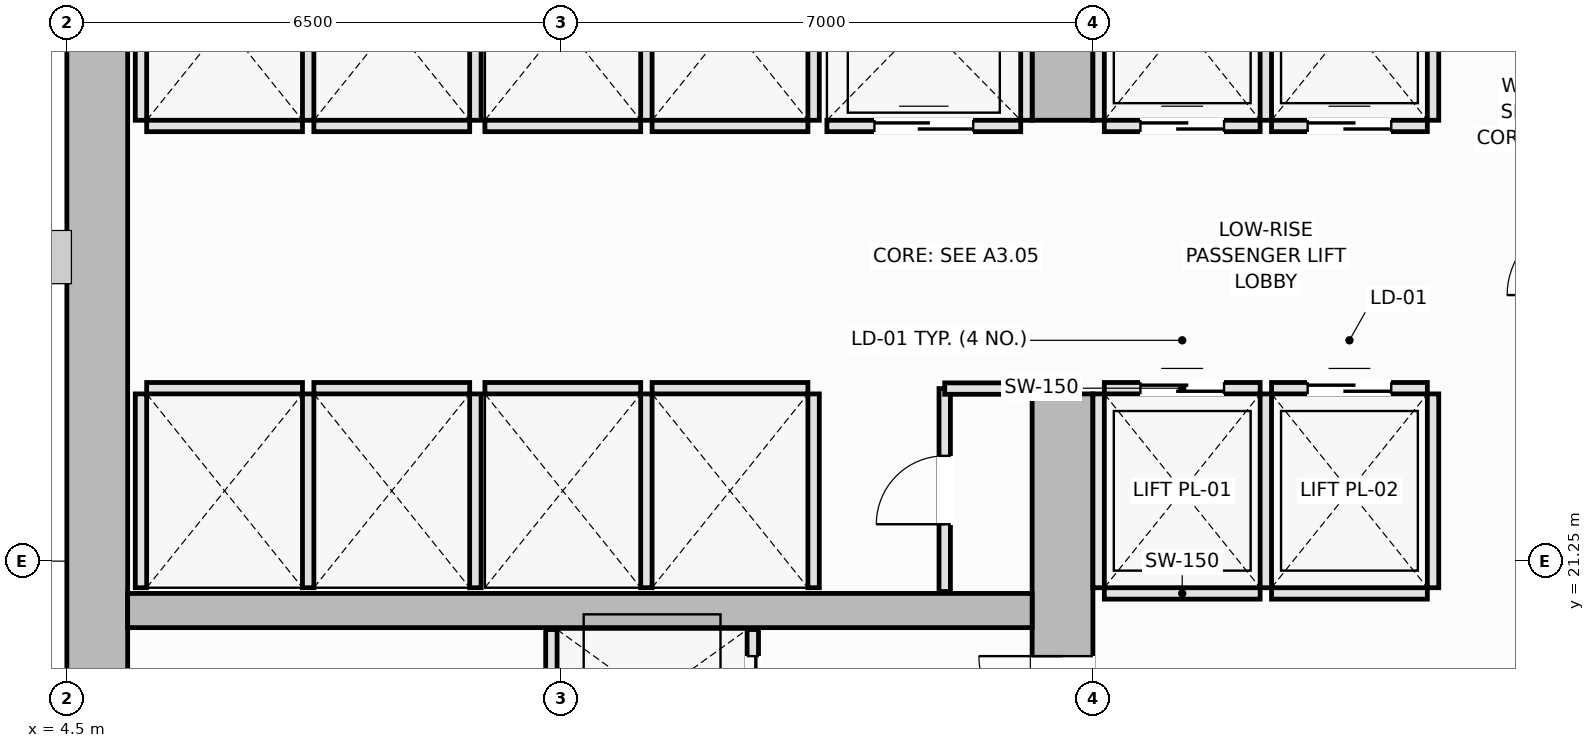
"""IFC4 building model, lengths in metres.
Left out: names, types, materials, properties, quantities, classifications, styles, units other than length and angle.
Written with IfcOpenShell. Run it as: python <this file> out.ifc"""

import sys

from ifc_helpers import new_model, si_unit, direction, frame, frame_2d, origin, place, context, subcontext, project, spatial, rectangle, extrude, element, fill, save


model = new_model("IFC4")
c1 = context("Model", 3, precision=1e-05, world=origin(), true_north=direction((0.0, 1.0)))
c2 = subcontext(c1, "Body", "Model", "MODEL_VIEW")
j1 = project(units=[si_unit("LENGTHUNIT", "METRE"), si_unit("PLANEANGLEUNIT", "RADIAN")], contexts=[c1])
p1 = place(None, origin())
s1 = spatial("IfcSite", under=j1, at=p1, CompositionType="ELEMENT")
p2 = place(p1, origin())
s2 = spatial("IfcBuilding", under=s1, at=p2, CompositionType="ELEMENT")
p3 = place(p2, frame((0.0, 0.0, 32.7)))
s3 = spatial("IfcBuildingStorey", under=s2, at=p3, CompositionType="ELEMENT", Elevation=32.7)
p4 = place(p3, frame((4.9, 14.8, 0.0), z_axis=(0.0, 0.0, 1.0), x_axis=(0.0, 1.0, 0.0)))
e1 = element("IfcWall", 1, at=p4, inside=s3, PredefinedType="SHEAR", context=c2, shape_type="SweptSolid", body=[
    extrude(rectangle(XDim=20.9, YDim=0.8, at=frame_2d((10.45, 0.0))), origin(), (0.0, 0.0, 1.0), 3.55),
])
p5 = place(p3, frame((17.6, 14.8, 0.0), z_axis=(0.0, 0.0, 1.0), x_axis=(0.0, 1.0, 0.0)))
e2 = element("IfcWall", 2, at=p5, inside=s3, PredefinedType="SHEAR", context=c2, shape_type="SweptSolid", body=[
    extrude(rectangle(XDim=8.65, YDim=0.8, at=frame_2d((4.325, 0.0))), origin(), (0.0, 0.0, 1.0), 3.55),
])
p6 = place(p5, frame((4.1, 0.0, 0.0)))
e3 = element("IfcOpeningElement", 3, at=p6, cuts=e2, PredefinedType="OPENING", context=c2, shape_type="SweptSolid", body=[
    extrude(rectangle(XDim=1.1, YDim=2.15, at=frame_2d((0.55, 1.075))), frame((0.0, 0.41, 0.0), z_axis=(0.0, -1.0, 0.0), x_axis=(1.0, 0.0, 0.0)), (0.0, 0.0, 1.0), 0.82),
])
p7 = place(p3, frame((17.6, 27.05, 0.0), z_axis=(0.0, 0.0, 1.0), x_axis=(0.0, 1.0, 0.0)))
e4 = element("IfcWall", 4, at=p7, inside=s3, PredefinedType="SHEAR", context=c2, shape_type="SweptSolid", body=[
    extrude(rectangle(XDim=8.65, YDim=0.8, at=frame_2d((4.325, 0.0))), origin(), (0.0, 0.0, 1.0), 3.55),
])
p8 = place(p7, frame((3.45, 0.0, 0.0)))
e5 = element("IfcOpeningElement", 5, at=p8, cuts=e4, PredefinedType="OPENING", context=c2, shape_type="SweptSolid", body=[
    extrude(rectangle(XDim=1.1, YDim=2.15, at=frame_2d((0.55, 1.075))), frame((0.0, 0.41, 0.0), z_axis=(0.0, -1.0, 0.0), x_axis=(1.0, 0.0, 0.0)), (0.0, 0.0, 1.0), 0.82),
])
p9 = place(p3, frame((5.3, 20.6, 0.0), z_axis=(0.0, 0.0, 1.0), x_axis=(1.0, 0.0, 0.0)))
e6 = element("IfcWall", 6, at=p9, inside=s3, PredefinedType="SHEAR", context=c2, shape_type="SweptSolid", body=[
    extrude(rectangle(XDim=11.9, YDim=0.45, at=frame_2d((5.95, 0.0))), origin(), (0.0, 0.0, 1.0), 3.55),
])
p10 = place(p3, frame((18.15, 20.825, 0.0), z_axis=(0.0, 0.0, 1.0), x_axis=(1.0, 0.0, 0.0)))
e7 = element("IfcWall", 7, at=p10, inside=s3, PredefinedType="PARTITIONING", context=c2, shape_type="SweptSolid", body=[
    extrude(rectangle(XDim=2.05, YDim=0.15, at=frame_2d((1.025, 0.0))), origin(), (0.0, 0.0, 1.0), 3.37),
])
p11 = place(p3, frame((18.15, 23.525, 0.0), z_axis=(0.0, 0.0, 1.0), x_axis=(1.0, 0.0, 0.0)))
e8 = element("IfcWall", 8, at=p11, inside=s3, PredefinedType="PARTITIONING", context=c2, shape_type="SweptSolid", body=[
    extrude(rectangle(XDim=2.05, YDim=0.15, at=frame_2d((1.025, 0.0))), origin(), (0.0, 0.0, 1.0), 3.37),
])
p12 = place(p11, frame((0.475, 0.0, 0.0)))
e9 = element("IfcOpeningElement", 9, at=p12, cuts=e8, PredefinedType="OPENING", context=c2, shape_type="SweptSolid", body=[
    extrude(rectangle(XDim=1.1, YDim=2.2, at=frame_2d((0.55, 1.1))), frame((0.0, 0.085, 0.0), z_axis=(0.0, -1.0, 0.0), x_axis=(1.0, 0.0, 0.0)), (0.0, 0.0, 1.0), 0.17),
])
for number, where, z_axis, x_axis in (
    (10, (18.075, 20.9, 0.0), (0.0, 0.0, 1.0), (0.0, 1.0, 0.0)),
    (11, (20.275, 20.9, 0.0), (0.0, 0.0, 1.0), (0.0, 1.0, 0.0)),
):
    element("IfcWall", number, at=place(p3, frame(where, z_axis=z_axis, x_axis=x_axis)), inside=s3, PredefinedType="PARTITIONING", context=c2, shape_type="SweptSolid", body=[
        extrude(rectangle(XDim=2.55, YDim=0.15, at=frame_2d((1.275, 0.0))), origin(), (0.0, 0.0, 1.0), 3.37),
    ])
p13 = place(p3, frame((20.35, 20.825, 0.0), z_axis=(0.0, 0.0, 1.0), x_axis=(1.0, 0.0, 0.0)))
e12 = element("IfcWall", 12, at=p13, inside=s3, PredefinedType="PARTITIONING", context=c2, shape_type="SweptSolid", body=[
    extrude(rectangle(XDim=2.05, YDim=0.15, at=frame_2d((1.025, 0.0))), origin(), (0.0, 0.0, 1.0), 3.37),
])
p14 = place(p3, frame((20.35, 23.525, 0.0), z_axis=(0.0, 0.0, 1.0), x_axis=(1.0, 0.0, 0.0)))
e13 = element("IfcWall", 13, at=p14, inside=s3, PredefinedType="PARTITIONING", context=c2, shape_type="SweptSolid", body=[
    extrude(rectangle(XDim=2.05, YDim=0.15, at=frame_2d((1.025, 0.0))), origin(), (0.0, 0.0, 1.0), 3.37),
])
p15 = place(p14, frame((0.475, 0.0, 0.0)))
e14 = element("IfcOpeningElement", 14, at=p15, cuts=e13, PredefinedType="OPENING", context=c2, shape_type="SweptSolid", body=[
    extrude(rectangle(XDim=1.1, YDim=2.2, at=frame_2d((0.55, 1.1))), frame((0.0, 0.085, 0.0), z_axis=(0.0, -1.0, 0.0), x_axis=(1.0, 0.0, 0.0)), (0.0, 0.0, 1.0), 0.17),
])
p16 = place(p3, frame((22.475, 20.9, 0.0), z_axis=(0.0, 0.0, 1.0), x_axis=(0.0, 1.0, 0.0)))
e15 = element("IfcWall", 15, at=p16, inside=s3, PredefinedType="PARTITIONING", context=c2, shape_type="SweptSolid", body=[
    extrude(rectangle(XDim=2.55, YDim=0.15, at=frame_2d((1.275, 0.0))), origin(), (0.0, 0.0, 1.0), 3.37),
])
p17 = place(p3, frame((18.15, 26.975, 0.0), z_axis=(0.0, 0.0, 1.0), x_axis=(1.0, 0.0, 0.0)))
e16 = element("IfcWall", 16, at=p17, inside=s3, PredefinedType="PARTITIONING", context=c2, shape_type="SweptSolid", body=[
    extrude(rectangle(XDim=2.05, YDim=0.15, at=frame_2d((1.025, 0.0))), origin(), (0.0, 0.0, 1.0), 3.37),
])
p18 = place(p17, frame((0.475, 0.0, 0.0)))
e17 = element("IfcOpeningElement", 17, at=p18, cuts=e16, PredefinedType="OPENING", context=c2, shape_type="SweptSolid", body=[
    extrude(rectangle(XDim=1.1, YDim=2.2, at=frame_2d((0.55, 1.1))), frame((0.0, 0.085, 0.0), z_axis=(0.0, -1.0, 0.0), x_axis=(1.0, 0.0, 0.0)), (0.0, 0.0, 1.0), 0.17),
])
for number, where, z_axis, x_axis in (
    (18, (18.075, 27.05, 0.0), (0.0, 0.0, 1.0), (0.0, 1.0, 0.0)),
    (19, (20.275, 27.05, 0.0), (0.0, 0.0, 1.0), (0.0, 1.0, 0.0)),
):
    element("IfcWall", number, at=place(p3, frame(where, z_axis=z_axis, x_axis=x_axis)), inside=s3, PredefinedType="PARTITIONING", context=c2, shape_type="SweptSolid", body=[
        extrude(rectangle(XDim=2.55, YDim=0.15, at=frame_2d((1.275, 0.0))), origin(), (0.0, 0.0, 1.0), 3.37),
    ])
p19 = place(p3, frame((20.35, 26.975, 0.0), z_axis=(0.0, 0.0, 1.0), x_axis=(1.0, 0.0, 0.0)))
e20 = element("IfcWall", 20, at=p19, inside=s3, PredefinedType="PARTITIONING", context=c2, shape_type="SweptSolid", body=[
    extrude(rectangle(XDim=2.05, YDim=0.15, at=frame_2d((1.025, 0.0))), origin(), (0.0, 0.0, 1.0), 3.37),
])
p20 = place(p19, frame((0.475, 0.0, 0.0)))
e21 = element("IfcOpeningElement", 21, at=p20, cuts=e20, PredefinedType="OPENING", context=c2, shape_type="SweptSolid", body=[
    extrude(rectangle(XDim=1.1, YDim=2.2, at=frame_2d((0.55, 1.1))), frame((0.0, 0.085, 0.0), z_axis=(0.0, -1.0, 0.0), x_axis=(1.0, 0.0, 0.0)), (0.0, 0.0, 1.0), 0.17),
])
p21 = place(p3, frame((22.475, 27.05, 0.0), z_axis=(0.0, 0.0, 1.0), x_axis=(0.0, 1.0, 0.0)))
e22 = element("IfcWall", 22, at=p21, inside=s3, PredefinedType="PARTITIONING", context=c2, shape_type="SweptSolid", body=[
    extrude(rectangle(XDim=2.55, YDim=0.15, at=frame_2d((1.275, 0.0))), origin(), (0.0, 0.0, 1.0), 3.37),
])
p22 = place(p3, frame((5.55, 23.525, 0.0), z_axis=(0.0, 0.0, 1.0), x_axis=(1.0, 0.0, 0.0)))
e23 = element("IfcWall", 23, at=p22, inside=s3, PredefinedType="PARTITIONING", context=c2, shape_type="SweptSolid", body=[
    extrude(rectangle(XDim=2.05, YDim=0.15, at=frame_2d((1.025, 0.0))), origin(), (0.0, 0.0, 1.0), 3.37),
])
for number, where, z_axis, x_axis in (
    (24, (5.475, 20.9, 0.0), (0.0, 0.0, 1.0), (0.0, 1.0, 0.0)),
    (25, (7.675, 20.9, 0.0), (0.0, 0.0, 1.0), (0.0, 1.0, 0.0)),
):
    element("IfcWall", number, at=place(p3, frame(where, z_axis=z_axis, x_axis=x_axis)), inside=s3, PredefinedType="PARTITIONING", context=c2, shape_type="SweptSolid", body=[
        extrude(rectangle(XDim=2.55, YDim=0.15, at=frame_2d((1.275, 0.0))), origin(), (0.0, 0.0, 1.0), 3.37),
    ])
p23 = place(p3, frame((7.75, 23.525, 0.0), z_axis=(0.0, 0.0, 1.0), x_axis=(1.0, 0.0, 0.0)))
e26 = element("IfcWall", 26, at=p23, inside=s3, PredefinedType="PARTITIONING", context=c2, shape_type="SweptSolid", body=[
    extrude(rectangle(XDim=2.05, YDim=0.15, at=frame_2d((1.025, 0.0))), origin(), (0.0, 0.0, 1.0), 3.37),
])
p24 = place(p3, frame((9.875, 20.9, 0.0), z_axis=(0.0, 0.0, 1.0), x_axis=(0.0, 1.0, 0.0)))
e27 = element("IfcWall", 27, at=p24, inside=s3, PredefinedType="PARTITIONING", context=c2, shape_type="SweptSolid", body=[
    extrude(rectangle(XDim=2.55, YDim=0.15, at=frame_2d((1.275, 0.0))), origin(), (0.0, 0.0, 1.0), 3.37),
])
p25 = place(p3, frame((5.55, 26.975, 0.0), z_axis=(0.0, 0.0, 1.0), x_axis=(1.0, 0.0, 0.0)))
e28 = element("IfcWall", 28, at=p25, inside=s3, PredefinedType="PARTITIONING", context=c2, shape_type="SweptSolid", body=[
    extrude(rectangle(XDim=2.05, YDim=0.15, at=frame_2d((1.025, 0.0))), origin(), (0.0, 0.0, 1.0), 3.37),
])
for number, where, z_axis, x_axis in (
    (29, (5.475, 27.05, 0.0), (0.0, 0.0, 1.0), (0.0, 1.0, 0.0)),
    (30, (7.675, 27.05, 0.0), (0.0, 0.0, 1.0), (0.0, 1.0, 0.0)),
):
    element("IfcWall", number, at=place(p3, frame(where, z_axis=z_axis, x_axis=x_axis)), inside=s3, PredefinedType="PARTITIONING", context=c2, shape_type="SweptSolid", body=[
        extrude(rectangle(XDim=2.55, YDim=0.15, at=frame_2d((1.275, 0.0))), origin(), (0.0, 0.0, 1.0), 3.37),
    ])
p26 = place(p3, frame((7.75, 26.975, 0.0), z_axis=(0.0, 0.0, 1.0), x_axis=(1.0, 0.0, 0.0)))
e31 = element("IfcWall", 31, at=p26, inside=s3, PredefinedType="PARTITIONING", context=c2, shape_type="SweptSolid", body=[
    extrude(rectangle(XDim=2.05, YDim=0.15, at=frame_2d((1.025, 0.0))), origin(), (0.0, 0.0, 1.0), 3.37),
])
p27 = place(p3, frame((9.875, 27.05, 0.0), z_axis=(0.0, 0.0, 1.0), x_axis=(0.0, 1.0, 0.0)))
e32 = element("IfcWall", 32, at=p27, inside=s3, PredefinedType="PARTITIONING", context=c2, shape_type="SweptSolid", body=[
    extrude(rectangle(XDim=2.55, YDim=0.15, at=frame_2d((1.275, 0.0))), origin(), (0.0, 0.0, 1.0), 3.37),
])
p28 = place(p3, frame((10.0, 23.525, 0.0), z_axis=(0.0, 0.0, 1.0), x_axis=(1.0, 0.0, 0.0)))
e33 = element("IfcWall", 33, at=p28, inside=s3, PredefinedType="PARTITIONING", context=c2, shape_type="SweptSolid", body=[
    extrude(rectangle(XDim=2.05, YDim=0.15, at=frame_2d((1.025, 0.0))), origin(), (0.0, 0.0, 1.0), 3.37),
])
p29 = place(p3, frame((12.125, 20.9, 0.0), z_axis=(0.0, 0.0, 1.0), x_axis=(0.0, 1.0, 0.0)))
e34 = element("IfcWall", 34, at=p29, inside=s3, PredefinedType="PARTITIONING", context=c2, shape_type="SweptSolid", body=[
    extrude(rectangle(XDim=2.55, YDim=0.15, at=frame_2d((1.275, 0.0))), origin(), (0.0, 0.0, 1.0), 3.37),
])
p30 = place(p3, frame((12.2, 23.525, 0.0), z_axis=(0.0, 0.0, 1.0), x_axis=(1.0, 0.0, 0.0)))
e35 = element("IfcWall", 35, at=p30, inside=s3, PredefinedType="PARTITIONING", context=c2, shape_type="SweptSolid", body=[
    extrude(rectangle(XDim=2.05, YDim=0.15, at=frame_2d((1.025, 0.0))), origin(), (0.0, 0.0, 1.0), 3.37),
])
p31 = place(p3, frame((14.325, 20.9, 0.0), z_axis=(0.0, 0.0, 1.0), x_axis=(0.0, 1.0, 0.0)))
e36 = element("IfcWall", 36, at=p31, inside=s3, PredefinedType="PARTITIONING", context=c2, shape_type="SweptSolid", body=[
    extrude(rectangle(XDim=2.55, YDim=0.15, at=frame_2d((1.275, 0.0))), origin(), (0.0, 0.0, 1.0), 3.37),
])
p32 = place(p3, frame((10.0, 26.975, 0.0), z_axis=(0.0, 0.0, 1.0), x_axis=(1.0, 0.0, 0.0)))
e37 = element("IfcWall", 37, at=p32, inside=s3, PredefinedType="PARTITIONING", context=c2, shape_type="SweptSolid", body=[
    extrude(rectangle(XDim=2.05, YDim=0.15, at=frame_2d((1.025, 0.0))), origin(), (0.0, 0.0, 1.0), 3.37),
])
p33 = place(p3, frame((12.125, 27.05, 0.0), z_axis=(0.0, 0.0, 1.0), x_axis=(0.0, 1.0, 0.0)))
e38 = element("IfcWall", 38, at=p33, inside=s3, PredefinedType="PARTITIONING", context=c2, shape_type="SweptSolid", body=[
    extrude(rectangle(XDim=2.55, YDim=0.15, at=frame_2d((1.275, 0.0))), origin(), (0.0, 0.0, 1.0), 3.37),
])
p34 = place(p3, frame((12.2, 26.975, 0.0), z_axis=(0.0, 0.0, 1.0), x_axis=(1.0, 0.0, 0.0)))
e39 = element("IfcWall", 39, at=p34, inside=s3, PredefinedType="PARTITIONING", context=c2, shape_type="SweptSolid", body=[
    extrude(rectangle(XDim=2.05, YDim=0.15, at=frame_2d((1.025, 0.0))), origin(), (0.0, 0.0, 1.0), 3.37),
])
p35 = place(p3, frame((14.325, 27.05, 0.0), z_axis=(0.0, 0.0, 1.0), x_axis=(0.0, 1.0, 0.0)))
e40 = element("IfcWall", 40, at=p35, inside=s3, PredefinedType="PARTITIONING", context=c2, shape_type="SweptSolid", body=[
    extrude(rectangle(XDim=2.55, YDim=0.15, at=frame_2d((1.275, 0.0))), origin(), (0.0, 0.0, 1.0), 3.37),
])
p36 = place(p3, frame((14.5, 26.975, 0.0), z_axis=(0.0, 0.0, 1.0), x_axis=(1.0, 0.0, 0.0)))
e41 = element("IfcWall", 41, at=p36, inside=s3, PredefinedType="PARTITIONING", context=c2, shape_type="SweptSolid", body=[
    extrude(rectangle(XDim=2.55, YDim=0.15, at=frame_2d((1.275, 0.0))), origin(), (0.0, 0.0, 1.0), 3.37),
])
p37 = place(p36, frame((0.625, 0.0, 0.0)))
e42 = element("IfcOpeningElement", 42, at=p37, cuts=e41, PredefinedType="OPENING", context=c2, shape_type="SweptSolid", body=[
    extrude(rectangle(XDim=1.3, YDim=2.2, at=frame_2d((0.65, 1.1))), frame((0.0, 0.085, 0.0), z_axis=(0.0, -1.0, 0.0), x_axis=(1.0, 0.0, 0.0)), (0.0, 0.0, 1.0), 0.17),
])
p38 = place(p3, frame((17.125, 27.05, 0.0), z_axis=(0.0, 0.0, 1.0), x_axis=(0.0, 1.0, 0.0)))
e43 = element("IfcWall", 43, at=p38, inside=s3, PredefinedType="PARTITIONING", context=c2, shape_type="SweptSolid", body=[
    extrude(rectangle(XDim=2.6, YDim=0.15, at=frame_2d((1.3, 0.0))), origin(), (0.0, 0.0, 1.0), 3.37),
])
p39 = place(p3, frame((10.875, 18.55, 0.0), z_axis=(0.0, 0.0, 1.0), x_axis=(0.0, 1.0, 0.0)))
e44 = element("IfcWall", 44, at=p39, inside=s3, PredefinedType="PARTITIONING", context=c2, shape_type="SweptSolid", body=[
    extrude(rectangle(XDim=1.8, YDim=0.15, at=frame_2d((0.9, 0.0))), origin(), (0.0, 0.0, 1.0), 3.37),
])
p40 = place(p3, frame((13.525, 18.55, 0.0), z_axis=(0.0, 0.0, 1.0), x_axis=(0.0, 1.0, 0.0)))
e45 = element("IfcWall", 45, at=p40, inside=s3, PredefinedType="PARTITIONING", context=c2, shape_type="SweptSolid", body=[
    extrude(rectangle(XDim=1.8, YDim=0.15, at=frame_2d((0.9, 0.0))), origin(), (0.0, 0.0, 1.0), 3.37),
])
p41 = place(p40, frame((0.35, 0.0, 0.0)))
e46 = element("IfcOpeningElement", 46, at=p41, cuts=e45, PredefinedType="OPENING", context=c2, shape_type="SweptSolid", body=[
    extrude(rectangle(XDim=1.1, YDim=2.2, at=frame_2d((0.55, 1.1))), frame((0.0, 0.085, 0.0), z_axis=(0.0, -1.0, 0.0), x_axis=(1.0, 0.0, 0.0)), (0.0, 0.0, 1.0), 0.17),
])
p42 = place(p3, frame((16.05, 20.85, 0.0), z_axis=(0.0, 0.0, 1.0), x_axis=(0.0, 1.0, 0.0)))
e47 = element("IfcWall", 47, at=p42, inside=s3, PredefinedType="PARTITIONING", context=c2, shape_type="SweptSolid", body=[
    extrude(rectangle(XDim=2.67, YDim=0.15, at=frame_2d((1.335, 0.0))), origin(), (0.0, 0.0, 1.0), 3.37),
])
p43 = place(p42, frame((0.885, 0.0, 0.0)))
e48 = element("IfcOpeningElement", 48, at=p43, cuts=e47, PredefinedType="OPENING", context=c2, shape_type="SweptSolid", body=[
    extrude(rectangle(XDim=0.9, YDim=2.1, at=frame_2d((0.45, 1.05))), frame((0.0, 0.085, 0.0), z_axis=(0.0, -1.0, 0.0), x_axis=(1.0, 0.0, 0.0)), (0.0, 0.0, 1.0), 0.17),
])
p44 = place(p3, frame((16.05, 23.52, 0.0), z_axis=(0.0, 0.0, 1.0), x_axis=(1.0, 0.0, 0.0)))
e49 = element("IfcWall", 49, at=p44, inside=s3, PredefinedType="PARTITIONING", context=c2, shape_type="SweptSolid", body=[
    extrude(rectangle(XDim=1.17, YDim=0.15, at=frame_2d((0.585, 0.0))), origin(), (0.0, 0.0, 1.0), 3.37),
])
p45 = place(p12, origin())
e50 = element("IfcDoor", 50, at=p45, inside=s3, OperationType="DOUBLE_DOOR_SLIDING", PredefinedType="DOOR", context=c2, shape_type="SweptSolid", body=[
    extrude(rectangle(XDim=1.1, YDim=2.2, at=frame_2d((0.55, 1.1))), frame((0.0, 0.025, 0.0), z_axis=(0.0, -1.0, 0.0), x_axis=(1.0, 0.0, 0.0)), (0.0, 0.0, 1.0), 0.05),
])
fill(e9, e50)
p46 = place(p15, origin())
e51 = element("IfcDoor", 51, at=p46, inside=s3, OperationType="DOUBLE_DOOR_SLIDING", PredefinedType="DOOR", context=c2, shape_type="SweptSolid", body=[
    extrude(rectangle(XDim=1.1, YDim=2.2, at=frame_2d((0.55, 1.1))), frame((0.0, 0.025, 0.0), z_axis=(0.0, -1.0, 0.0), x_axis=(1.0, 0.0, 0.0)), (0.0, 0.0, 1.0), 0.05),
])
fill(e14, e51)
p47 = place(p18, origin())
e52 = element("IfcDoor", 52, at=p47, inside=s3, OperationType="DOUBLE_DOOR_SLIDING", PredefinedType="DOOR", context=c2, shape_type="SweptSolid", body=[
    extrude(rectangle(XDim=1.1, YDim=2.2, at=frame_2d((0.55, 1.1))), frame((0.0, 0.025, 0.0), z_axis=(0.0, -1.0, 0.0), x_axis=(1.0, 0.0, 0.0)), (0.0, 0.0, 1.0), 0.05),
])
fill(e17, e52)
p48 = place(p20, origin())
e53 = element("IfcDoor", 53, at=p48, inside=s3, OperationType="DOUBLE_DOOR_SLIDING", PredefinedType="DOOR", context=c2, shape_type="SweptSolid", body=[
    extrude(rectangle(XDim=1.1, YDim=2.2, at=frame_2d((0.55, 1.1))), frame((0.0, 0.025, 0.0), z_axis=(0.0, -1.0, 0.0), x_axis=(1.0, 0.0, 0.0)), (0.0, 0.0, 1.0), 0.05),
])
fill(e21, e53)
p49 = place(p37, origin())
e54 = element("IfcDoor", 54, at=p49, inside=s3, OperationType="DOUBLE_DOOR_SLIDING", PredefinedType="DOOR", context=c2, shape_type="SweptSolid", body=[
    extrude(rectangle(XDim=1.3, YDim=2.2, at=frame_2d((0.65, 1.1))), frame((0.0, 0.025, 0.0), z_axis=(0.0, -1.0, 0.0), x_axis=(1.0, 0.0, 0.0)), (0.0, 0.0, 1.0), 0.05),
])
fill(e42, e54)
p50 = place(p41, origin())
e55 = element("IfcDoor", 55, at=p50, inside=s3, OperationType="DOUBLE_DOOR_SLIDING", PredefinedType="DOOR", context=c2, shape_type="SweptSolid", body=[
    extrude(rectangle(XDim=1.1, YDim=2.2, at=frame_2d((0.55, 1.1))), frame((0.0, 0.025, 0.0), z_axis=(0.0, -1.0, 0.0), x_axis=(1.0, 0.0, 0.0)), (0.0, 0.0, 1.0), 0.05),
])
fill(e46, e55)
p51 = place(p6, origin())
e56 = element("IfcDoor", 56, at=p51, inside=s3, OperationType="SINGLE_SWING_RIGHT", PredefinedType="DOOR", context=c2, shape_type="SweptSolid", body=[
    extrude(rectangle(XDim=1.1, YDim=2.15, at=frame_2d((0.55, 1.075))), frame((0.0, 0.025, 0.0), z_axis=(0.0, -1.0, 0.0), x_axis=(1.0, 0.0, 0.0)), (0.0, 0.0, 1.0), 0.05),
])
fill(e3, e56)
p52 = place(p43, origin())
e57 = element("IfcDoor", 57, at=p52, inside=s3, OperationType="SINGLE_SWING_LEFT", PredefinedType="DOOR", context=c2, shape_type="SweptSolid", body=[
    extrude(rectangle(XDim=0.9, YDim=2.1, at=frame_2d((0.45, 1.05))), frame((0.0, 0.025, 0.0), z_axis=(0.0, -1.0, 0.0), x_axis=(1.0, 0.0, 0.0)), (0.0, 0.0, 1.0), 0.05),
])
fill(e48, e57)
save(model, sys.argv[1])
